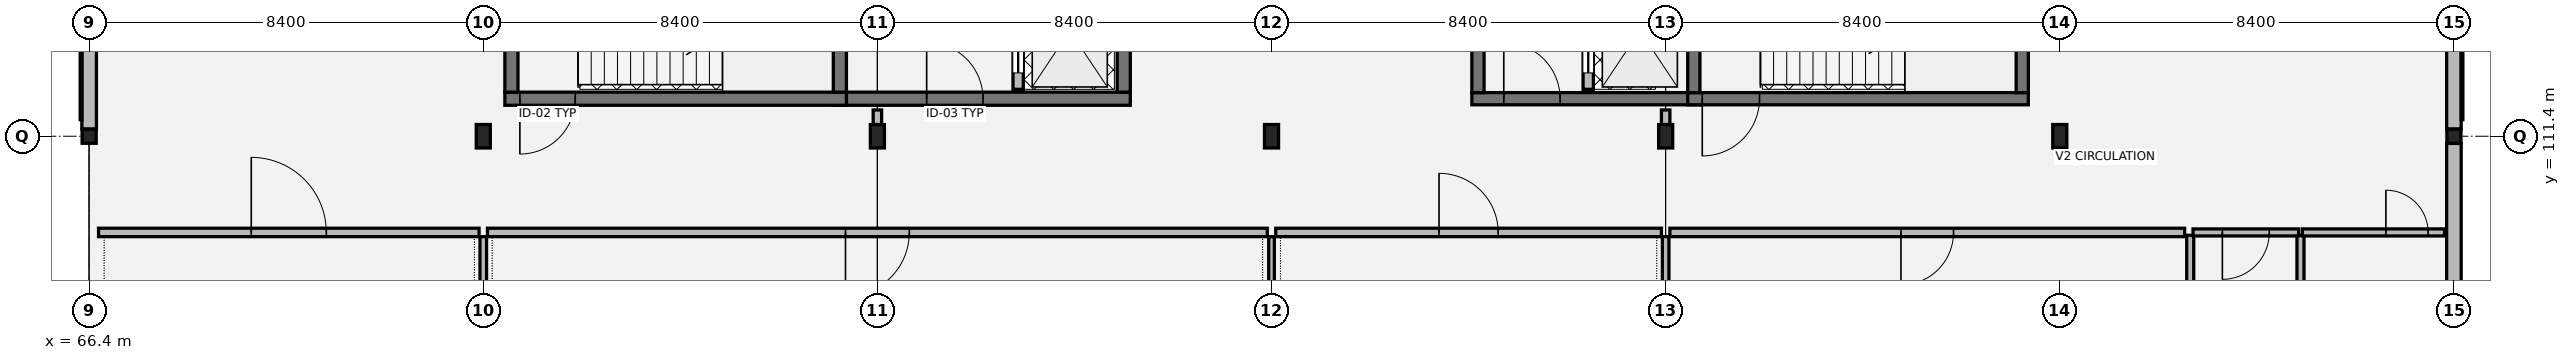
"""IFC4 building model, lengths in metres.
Left out: names, types, materials, properties, quantities, classifications, styles, units other than length and angle.
Written with IfcOpenShell. Run it as: python <this file> out.ifc"""

import sys

from ifc_helpers import new_model, si_unit, direction, frame, frame_2d, origin, origin_2d, place, context, subcontext, project, spatial, rectangle, hollow_rectangle, i_section, extrude, element, fill, save


model = new_model("IFC4")
c1 = context("Model", 3, precision=1e-05, world=origin(), true_north=direction((0.0, 1.0)))
c2 = subcontext(c1, "Body", "Model", "MODEL_VIEW")
j1 = project(units=[si_unit("LENGTHUNIT", "METRE"), si_unit("PLANEANGLEUNIT", "RADIAN")], contexts=[c1])
p1 = place(None, origin())
s1 = spatial("IfcSite", under=j1, at=p1, CompositionType="ELEMENT")
p2 = place(p1, origin())
s2 = spatial("IfcBuilding", under=s1, at=p2, CompositionType="ELEMENT")
p3 = place(p2, frame((0.0, 0.0, 5.1)))
s3 = spatial("IfcBuildingStorey", under=s2, at=p3, CompositionType="ELEMENT", Elevation=5.1)
p4 = place(p3, frame((66.4, 111.4, 0.0), z_axis=(0.0, 0.0, 1.0), x_axis=(1.0, 0.0, 0.0)))
e1 = element("IfcColumn", 1, at=p4, inside=s3, PredefinedType="COLUMN", context=c2, shape_type="SweptSolid", body=[
    extrude(hollow_rectangle(XDim=0.3, YDim=0.3, WallThickness=0.012, at=origin_2d()), origin(), (0.0, 0.0, 1.0), 4.055),
])
for number, where, z_axis, x_axis in (
    (2, (74.8, 111.4, 0.0), (0.0, 0.0, 1.0), (1.0, 0.0, 0.0)),
    (3, (83.2, 111.4, 0.0), (0.0, 0.0, 1.0), (1.0, 0.0, 0.0)),
    (4, (91.6, 111.4, 0.0), (0.0, 0.0, 1.0), (1.0, 0.0, 0.0)),
    (5, (100.0, 111.4, 0.0), (0.0, 0.0, 1.0), (1.0, 0.0, 0.0)),
    (6, (108.4, 111.4, 0.0), (0.0, 0.0, 1.0), (1.0, 0.0, 0.0)),
):
    element("IfcColumn", number, at=place(p3, frame(where, z_axis=z_axis, x_axis=x_axis)), inside=s3, PredefinedType="COLUMN", context=c2, shape_type="SweptSolid", body=[
        extrude(i_section(OverallWidth=0.3, OverallDepth=0.5, WebThickness=0.014, FlangeThickness=0.028, at=origin_2d()), origin(), (0.0, 0.0, 1.0), 4.055),
    ])
p5 = place(p3, frame((116.8, 111.4, 0.0), z_axis=(0.0, 0.0, 1.0), x_axis=(1.0, 0.0, 0.0)))
e7 = element("IfcColumn", 7, at=p5, inside=s3, PredefinedType="COLUMN", context=c2, shape_type="SweptSolid", body=[
    extrude(hollow_rectangle(XDim=0.3, YDim=0.3, WallThickness=0.012, at=origin_2d()), origin(), (0.0, 0.0, 1.0), 4.055),
])
p6 = place(p3, frame((116.8, 103.953, 0.0), z_axis=(0.0, 0.0, 1.0), x_axis=(0.0, 1.0, 0.0)))
e8 = element("IfcWall", 8, at=p6, inside=s3, PredefinedType="SOLIDWALL", context=c2, shape_type="SweptSolid", body=[
    extrude(rectangle(XDim=7.294, YDim=0.31, at=frame_2d((3.647, 0.0))), origin(), (0.0, 0.0, 1.0), 3.48),
])
p7 = place(p3, frame((116.8, 111.553, 0.0), z_axis=(0.0, 0.0, 1.0), x_axis=(0.0, 1.0, 0.0)))
e9 = element("IfcWall", 9, at=p7, inside=s3, PredefinedType="SOLIDWALL", context=c2, shape_type="SweptSolid", body=[
    extrude(rectangle(XDim=7.294, YDim=0.31, at=frame_2d((3.647, 0.0))), origin(), (0.0, 0.0, 1.0), 3.48),
])
p8 = place(p7, frame((2.042, 0.0, 0.8)))
e10 = element("IfcOpeningElement", 10, at=p8, cuts=e9, PredefinedType="OPENING", context=c2, shape_type="SweptSolid", body=[
    extrude(rectangle(XDim=1.28, YDim=2.08, at=frame_2d((0.64, 1.04))), frame((0.0, 0.165, 0.0), z_axis=(0.0, -1.0, 0.0), x_axis=(1.0, 0.0, 0.0)), (0.0, 0.0, 1.0), 0.33),
])
p9 = place(p7, frame((3.972, 0.0, 0.8)))
e11 = element("IfcOpeningElement", 11, at=p9, cuts=e9, PredefinedType="OPENING", context=c2, shape_type="SweptSolid", body=[
    extrude(rectangle(XDim=1.28, YDim=2.08, at=frame_2d((0.64, 1.04))), frame((0.0, 0.165, 0.0), z_axis=(0.0, -1.0, 0.0), x_axis=(1.0, 0.0, 0.0)), (0.0, 0.0, 1.0), 0.33),
])
p10 = place(p3, frame((66.4, 118.847, 0.0), z_axis=(0.0, 0.0, 1.0), x_axis=(0.0, -1.0, 0.0)))
e12 = element("IfcWall", 12, at=p10, inside=s3, PredefinedType="SOLIDWALL", context=c2, shape_type="SweptSolid", body=[
    extrude(rectangle(XDim=7.294, YDim=0.31, at=frame_2d((3.647, 0.0))), origin(), (0.0, 0.0, 1.0), 3.48),
])
p11 = place(p10, frame((2.042, 0.0, 0.8)))
e13 = element("IfcOpeningElement", 13, at=p11, cuts=e12, PredefinedType="OPENING", context=c2, shape_type="SweptSolid", body=[
    extrude(rectangle(XDim=1.28, YDim=2.08, at=frame_2d((0.64, 1.04))), frame((0.0, 0.165, 0.0), z_axis=(0.0, -1.0, 0.0), x_axis=(1.0, 0.0, 0.0)), (0.0, 0.0, 1.0), 0.33),
])
p12 = place(p10, frame((3.972, 0.0, 0.8)))
e14 = element("IfcOpeningElement", 14, at=p12, cuts=e12, PredefinedType="OPENING", context=c2, shape_type="SweptSolid", body=[
    extrude(rectangle(XDim=1.28, YDim=2.08, at=frame_2d((0.64, 1.04))), frame((0.0, 0.165, 0.0), z_axis=(0.0, -1.0, 0.0), x_axis=(1.0, 0.0, 0.0)), (0.0, 0.0, 1.0), 0.33),
])
p13 = place(p3, frame((82.26, 112.2, 0.0), z_axis=(0.0, 0.0, 1.0), x_axis=(1.0, 0.0, 0.0)))
e15 = element("IfcWall", 15, at=p13, inside=s3, PredefinedType="SHEAR", context=c2, shape_type="SweptSolid", body=[
    extrude(rectangle(XDim=6.33, YDim=0.28, at=frame_2d((3.165, 0.0))), origin(), (0.0, 0.0, 1.0), 3.845),
])
p14 = place(p13, frame((1.99, 0.0, 0.0)))
e16 = element("IfcOpeningElement", 16, at=p14, cuts=e15, PredefinedType="OPENING", context=c2, shape_type="SweptSolid", body=[
    extrude(rectangle(XDim=1.2, YDim=2.16, at=frame_2d((0.6, 1.08))), frame((0.0, 0.15, 0.0), z_axis=(0.0, -1.0, 0.0), x_axis=(1.0, 0.0, 0.0)), (0.0, 0.0, 1.0), 0.3),
])
p15 = place(p3, frame((88.45, 112.34, 0.0), z_axis=(0.0, 0.0, 1.0), x_axis=(0.0, 1.0, 0.0)))
e17 = element("IfcWall", 17, at=p15, inside=s3, PredefinedType="SHEAR", context=c2, shape_type="SweptSolid", body=[
    extrude(rectangle(XDim=5.72, YDim=0.28, at=frame_2d((2.86, 0.0))), origin(), (0.0, 0.0, 1.0), 3.845),
])
p16 = place(p3, frame((86.2, 112.4, 0.0), z_axis=(0.0, 0.0, 1.0), x_axis=(0.0, 1.0, 0.0)))
e18 = element("IfcWall", 18, at=p16, inside=s3, PredefinedType="SOLIDWALL", context=c2, shape_type="SweptSolid", body=[
    extrude(rectangle(XDim=5.6, YDim=0.22, at=frame_2d((2.8, 0.0))), origin(), (0.0, 0.0, 1.0), 3.845),
])
p17 = place(p16, frame((0.35, 0.0, 0.0)))
e19 = element("IfcOpeningElement", 19, at=p17, cuts=e18, PredefinedType="OPENING", context=c2, shape_type="SweptSolid", body=[
    extrude(rectangle(XDim=1.1, YDim=2.15, at=frame_2d((0.55, 1.075))), frame((0.0, 0.12, 0.0), z_axis=(0.0, -1.0, 0.0), x_axis=(1.0, 0.0, 0.0)), (0.0, 0.0, 1.0), 0.24),
])
p18 = place(p16, frame((2.4, 0.0, 0.0)))
e20 = element("IfcOpeningElement", 20, at=p18, cuts=e18, PredefinedType="OPENING", context=c2, shape_type="SweptSolid", body=[
    extrude(rectangle(XDim=1.1, YDim=2.15, at=frame_2d((0.55, 1.075))), frame((0.0, 0.12, 0.0), z_axis=(0.0, -1.0, 0.0), x_axis=(1.0, 0.0, 0.0)), (0.0, 0.0, 1.0), 0.24),
])
p19 = place(p3, frame((75.26, 112.2, 0.0), z_axis=(0.0, 0.0, 1.0), x_axis=(1.0, 0.0, 0.0)))
e21 = element("IfcWall", 21, at=p19, inside=s3, PredefinedType="SHEAR", context=c2, shape_type="SweptSolid", body=[
    extrude(rectangle(XDim=7.28, YDim=0.28, at=frame_2d((3.64, 0.0))), origin(), (0.0, 0.0, 1.0), 3.845),
])
p20 = place(p19, frame((0.32, 0.0, 0.0)))
e22 = element("IfcOpeningElement", 22, at=p20, cuts=e21, PredefinedType="OPENING", context=c2, shape_type="SweptSolid", body=[
    extrude(rectangle(XDim=1.18, YDim=2.18, at=frame_2d((0.59, 1.09))), frame((0.0, 0.15, 0.0), z_axis=(0.0, -1.0, 0.0), x_axis=(1.0, 0.0, 0.0)), (0.0, 0.0, 1.0), 0.3),
])
for number, where, z_axis, x_axis in (
    (23, (75.4, 112.34, 0.0), (0.0, 0.0, 1.0), (0.0, 1.0, 0.0)),
    (24, (82.4, 112.34, 0.0), (0.0, 0.0, 1.0), (0.0, 1.0, 0.0)),
):
    element("IfcWall", number, at=place(p3, frame(where, z_axis=z_axis, x_axis=x_axis)), inside=s3, PredefinedType="SHEAR", context=c2, shape_type="SweptSolid", body=[
        extrude(rectangle(XDim=5.72, YDim=0.28, at=frame_2d((2.86, 0.0))), origin(), (0.0, 0.0, 1.0), 3.845),
    ])
p21 = place(p3, frame((95.87, 112.2, 0.0), z_axis=(0.0, 0.0, 1.0), x_axis=(1.0, 0.0, 0.0)))
e25 = element("IfcWall", 25, at=p21, inside=s3, PredefinedType="SHEAR", context=c2, shape_type="SweptSolid", body=[
    extrude(rectangle(XDim=4.86, YDim=0.26, at=frame_2d((2.43, 0.0))), origin(), (0.0, 0.0, 1.0), 3.845),
])
p22 = place(p21, frame((0.68, 0.0, 0.0)))
e26 = element("IfcOpeningElement", 26, at=p22, cuts=e25, PredefinedType="OPENING", context=c2, shape_type="SweptSolid", body=[
    extrude(rectangle(XDim=1.2, YDim=2.16, at=frame_2d((0.6, 1.08))), frame((0.0, 0.14, 0.0), z_axis=(0.0, -1.0, 0.0), x_axis=(1.0, 0.0, 0.0)), (0.0, 0.0, 1.0), 0.28),
])
p23 = place(p3, frame((96.0, 118.07, 0.0), z_axis=(0.0, 0.0, 1.0), x_axis=(0.0, -1.0, 0.0)))
e27 = element("IfcWall", 27, at=p23, inside=s3, PredefinedType="SHEAR", context=c2, shape_type="SweptSolid", body=[
    extrude(rectangle(XDim=5.74, YDim=0.26, at=frame_2d((2.87, 0.0))), origin(), (0.0, 0.0, 1.0), 3.845),
])
p24 = place(p3, frame((98.35, 112.4, 0.0), z_axis=(0.0, 0.0, 1.0), x_axis=(0.0, 1.0, 0.0)))
e28 = element("IfcWall", 28, at=p24, inside=s3, PredefinedType="SOLIDWALL", context=c2, shape_type="SweptSolid", body=[
    extrude(rectangle(XDim=5.6, YDim=0.22, at=frame_2d((2.8, 0.0))), origin(), (0.0, 0.0, 1.0), 3.845),
])
p25 = place(p24, frame((0.35, 0.0, 0.0)))
e29 = element("IfcOpeningElement", 29, at=p25, cuts=e28, PredefinedType="OPENING", context=c2, shape_type="SweptSolid", body=[
    extrude(rectangle(XDim=1.1, YDim=2.15, at=frame_2d((0.55, 1.075))), frame((0.0, 0.12, 0.0), z_axis=(0.0, -1.0, 0.0), x_axis=(1.0, 0.0, 0.0)), (0.0, 0.0, 1.0), 0.24),
])
p26 = place(p3, frame((100.47, 112.2, 0.0), z_axis=(0.0, 0.0, 1.0), x_axis=(1.0, 0.0, 0.0)))
e30 = element("IfcWall", 30, at=p26, inside=s3, PredefinedType="SHEAR", context=c2, shape_type="SweptSolid", body=[
    extrude(rectangle(XDim=7.26, YDim=0.26, at=frame_2d((3.63, 0.0))), origin(), (0.0, 0.0, 1.0), 3.845),
])
p27 = place(p26, frame((0.31, 0.0, 0.0)))
e31 = element("IfcOpeningElement", 31, at=p27, cuts=e30, PredefinedType="OPENING", context=c2, shape_type="SweptSolid", body=[
    extrude(rectangle(XDim=1.22, YDim=2.18, at=frame_2d((0.61, 1.09))), frame((0.0, 0.14, 0.0), z_axis=(0.0, -1.0, 0.0), x_axis=(1.0, 0.0, 0.0)), (0.0, 0.0, 1.0), 0.28),
])
for number, where, z_axis, x_axis in (
    (32, (100.6, 112.33, 0.0), (0.0, 0.0, 1.0), (0.0, 1.0, 0.0)),
    (33, (107.6, 112.33, 0.0), (0.0, 0.0, 1.0), (0.0, 1.0, 0.0)),
):
    element("IfcWall", number, at=place(p3, frame(where, z_axis=z_axis, x_axis=x_axis)), inside=s3, PredefinedType="SHEAR", context=c2, shape_type="SweptSolid", body=[
        extrude(rectangle(XDim=5.74, YDim=0.26, at=frame_2d((2.87, 0.0))), origin(), (0.0, 0.0, 1.0), 3.845),
    ])
for number, where, z_axis, x_axis in (
    (34, (111.18, 106.93, 0.0), (0.0, 0.0, 1.0), (0.0, 1.0, 0.0)),
    (35, (113.53, 106.93, 0.0), (0.0, 0.0, 1.0), (0.0, 1.0, 0.0)),
):
    element("IfcWall", number, at=place(p3, frame(where, z_axis=z_axis, x_axis=x_axis)), inside=s3, PredefinedType="PARTITIONING", context=c2, shape_type="SweptSolid", body=[
        extrude(rectangle(XDim=2.36, YDim=0.15, at=frame_2d((1.18, 0.0))), origin(), (0.0, 0.0, 1.0), 3.18),
    ])
p28 = place(p3, frame((111.24, 109.35, 0.0), z_axis=(0.0, 0.0, 1.0), x_axis=(1.0, 0.0, 0.0)))
e36 = element("IfcWall", 36, at=p28, inside=s3, PredefinedType="PARTITIONING", context=c2, shape_type="SweptSolid", body=[
    extrude(rectangle(XDim=2.25, YDim=0.15, at=frame_2d((1.125, 0.0))), origin(), (0.0, 0.0, 1.0), 3.18),
])
p29 = place(p28, frame((0.625, 0.0, 0.0)))
e37 = element("IfcOpeningElement", 37, at=p29, cuts=e36, PredefinedType="OPENING", context=c2, shape_type="SweptSolid", body=[
    extrude(rectangle(XDim=1.0, YDim=2.15, at=frame_2d((0.5, 1.075))), frame((0.0, 0.085, 0.0), z_axis=(0.0, -1.0, 0.0), x_axis=(1.0, 0.0, 0.0)), (0.0, 0.0, 1.0), 0.17),
])
p30 = place(p3, frame((113.57, 109.35, 0.0), z_axis=(0.0, 0.0, 1.0), x_axis=(1.0, 0.0, 0.0)))
e38 = element("IfcWall", 38, at=p30, inside=s3, PredefinedType="PARTITIONING", context=c2, shape_type="SweptSolid", body=[
    extrude(rectangle(XDim=3.03, YDim=0.15, at=frame_2d((1.515, 0.0))), origin(), (0.0, 0.0, 1.0), 3.18),
])
p31 = place(p30, frame((1.78, 0.0, 0.0)))
e39 = element("IfcOpeningElement", 39, at=p31, cuts=e38, PredefinedType="OPENING", context=c2, shape_type="SweptSolid", body=[
    extrude(rectangle(XDim=0.9, YDim=2.15, at=frame_2d((0.45, 1.075))), frame((0.0, 0.085, 0.0), z_axis=(0.0, -1.0, 0.0), x_axis=(1.0, 0.0, 0.0)), (0.0, 0.0, 1.0), 0.17),
])
p32 = place(p3, frame((66.6, 109.35, 0.0), z_axis=(0.0, 0.0, 1.0), x_axis=(1.0, 0.0, 0.0)))
e40 = element("IfcWall", 40, at=p32, inside=s3, PredefinedType="PARTITIONING", context=c2, shape_type="SweptSolid", body=[
    extrude(rectangle(XDim=8.11, YDim=0.18, at=frame_2d((4.055, 0.0))), origin(), (0.0, 0.0, 1.0), 3.18),
])
p33 = place(p32, frame((3.255, 0.0, 0.0)))
e41 = element("IfcOpeningElement", 41, at=p33, cuts=e40, PredefinedType="OPENING", context=c2, shape_type="SweptSolid", body=[
    extrude(rectangle(XDim=1.6, YDim=2.25, at=frame_2d((0.8, 1.125))), frame((0.0, 0.1, 0.0), z_axis=(0.0, -1.0, 0.0), x_axis=(1.0, 0.0, 0.0)), (0.0, 0.0, 1.0), 0.2),
])
p34 = place(p3, frame((74.89, 109.35, 0.0), z_axis=(0.0, 0.0, 1.0), x_axis=(1.0, 0.0, 0.0)))
e42 = element("IfcWall", 42, at=p34, inside=s3, PredefinedType="PARTITIONING", context=c2, shape_type="SweptSolid", body=[
    extrude(rectangle(XDim=16.62, YDim=0.18, at=frame_2d((8.31, 0.0))), origin(), (0.0, 0.0, 1.0), 3.18),
])
p35 = place(p34, frame((7.63, 0.0, 0.0)))
e43 = element("IfcOpeningElement", 43, at=p35, cuts=e42, PredefinedType="OPENING", context=c2, shape_type="SweptSolid", body=[
    extrude(rectangle(XDim=1.36, YDim=2.2, at=frame_2d((0.68, 1.1))), frame((0.0, 0.1, 0.0), z_axis=(0.0, -1.0, 0.0), x_axis=(1.0, 0.0, 0.0)), (0.0, 0.0, 1.0), 0.2),
])
p36 = place(p3, frame((91.69, 109.35, 0.0), z_axis=(0.0, 0.0, 1.0), x_axis=(1.0, 0.0, 0.0)))
e44 = element("IfcWall", 44, at=p36, inside=s3, PredefinedType="PARTITIONING", context=c2, shape_type="SweptSolid", body=[
    extrude(rectangle(XDim=8.22, YDim=0.18, at=frame_2d((4.11, 0.0))), origin(), (0.0, 0.0, 1.0), 3.18),
])
p37 = place(p36, frame((3.48, 0.0, 0.0)))
e45 = element("IfcOpeningElement", 45, at=p37, cuts=e44, PredefinedType="OPENING", context=c2, shape_type="SweptSolid", body=[
    extrude(rectangle(XDim=1.26, YDim=2.2, at=frame_2d((0.63, 1.1))), frame((0.0, 0.1, 0.0), z_axis=(0.0, -1.0, 0.0), x_axis=(1.0, 0.0, 0.0)), (0.0, 0.0, 1.0), 0.2),
])
p38 = place(p3, frame((100.09, 109.35, 0.0), z_axis=(0.0, 0.0, 1.0), x_axis=(1.0, 0.0, 0.0)))
e46 = element("IfcWall", 46, at=p38, inside=s3, PredefinedType="PARTITIONING", context=c2, shape_type="SweptSolid", body=[
    extrude(rectangle(XDim=10.97, YDim=0.18, at=frame_2d((5.485, 0.0))), origin(), (0.0, 0.0, 1.0), 3.18),
])
p39 = place(p38, frame((4.925, 0.0, 0.0)))
e47 = element("IfcOpeningElement", 47, at=p39, cuts=e46, PredefinedType="OPENING", context=c2, shape_type="SweptSolid", body=[
    extrude(rectangle(XDim=1.12, YDim=2.15, at=frame_2d((0.56, 1.075))), frame((0.0, 0.1, 0.0), z_axis=(0.0, -1.0, 0.0), x_axis=(1.0, 0.0, 0.0)), (0.0, 0.0, 1.0), 0.2),
])
for number, where, z_axis, x_axis in (
    (48, (83.2, 111.64, 0.0), (0.0, 0.0, 1.0), (0.0, 1.0, 0.0)),
    (49, (100.0, 111.64, 0.0), (0.0, 0.0, 1.0), (0.0, 1.0, 0.0)),
):
    element("IfcWall", number, at=place(p3, frame(where, z_axis=z_axis, x_axis=x_axis)), inside=s3, PredefinedType="PARTITIONING", context=c2, shape_type="SweptSolid", body=[
        extrude(rectangle(XDim=0.32, YDim=0.18, at=frame_2d((0.16, 0.0))), origin(), (0.0, 0.0, 1.0), 3.18),
    ])
p40 = place(p3, frame((74.8, 81.32, 0.0), z_axis=(0.0, 0.0, 1.0), x_axis=(0.0, 1.0, 0.0)))
e50 = element("IfcWall", 50, at=p40, inside=s3, PredefinedType="PARTITIONING", context=c2, shape_type="SweptSolid", body=[
    extrude(rectangle(XDim=27.94, YDim=0.14, at=frame_2d((13.97, 0.0))), origin(), (0.0, 0.0, 1.0), 3.18),
])
p41 = place(p3, frame((91.6, 81.32, 0.0), z_axis=(0.0, 0.0, 1.0), x_axis=(0.0, 1.0, 0.0)))
e51 = element("IfcWall", 51, at=p41, inside=s3, PredefinedType="PARTITIONING", context=c2, shape_type="SweptSolid", body=[
    extrude(rectangle(XDim=27.94, YDim=0.12, at=frame_2d((13.97, 0.0))), origin(), (0.0, 0.0, 1.0), 3.18),
])
p42 = place(p3, frame((100.0, 81.32, 0.0), z_axis=(0.0, 0.0, 1.0), x_axis=(0.0, 1.0, 0.0)))
e52 = element("IfcWall", 52, at=p42, inside=s3, PredefinedType="PARTITIONING", context=c2, shape_type="SweptSolid", body=[
    extrude(rectangle(XDim=27.94, YDim=0.14, at=frame_2d((13.97, 0.0))), origin(), (0.0, 0.0, 1.0), 3.18),
])
p43 = place(p14, origin())
e53 = element("IfcDoor", 53, at=p43, inside=s3, OperationType="SINGLE_SWING_LEFT", PredefinedType="DOOR", context=c2, shape_type="SweptSolid", body=[
    extrude(rectangle(XDim=1.2, YDim=2.16, at=frame_2d((0.6, 1.08))), frame((0.0, 0.025, 0.0), z_axis=(0.0, -1.0, 0.0), x_axis=(1.0, 0.0, 0.0)), (0.0, 0.0, 1.0), 0.05),
])
fill(e16, e53)
p44 = place(p17, origin())
e54 = element("IfcDoor", 54, at=p44, inside=s3, OperationType="SLIDING_TO_LEFT", PredefinedType="DOOR", context=c2, shape_type="SweptSolid", body=[
    extrude(rectangle(XDim=1.1, YDim=2.15, at=frame_2d((0.55, 1.075))), frame((0.0, 0.025, 0.0), z_axis=(0.0, -1.0, 0.0), x_axis=(1.0, 0.0, 0.0)), (0.0, 0.0, 1.0), 0.05),
])
fill(e19, e54)
p45 = place(p20, origin())
e55 = element("IfcDoor", 55, at=p45, inside=s3, OperationType="SINGLE_SWING_RIGHT", PredefinedType="DOOR", context=c2, shape_type="SweptSolid", body=[
    extrude(rectangle(XDim=1.18, YDim=2.18, at=frame_2d((0.59, 1.09))), frame((0.0, 0.025, 0.0), z_axis=(0.0, -1.0, 0.0), x_axis=(1.0, 0.0, 0.0)), (0.0, 0.0, 1.0), 0.05),
])
fill(e22, e55)
p46 = place(p22, origin())
e56 = element("IfcDoor", 56, at=p46, inside=s3, OperationType="SINGLE_SWING_LEFT", PredefinedType="DOOR", context=c2, shape_type="SweptSolid", body=[
    extrude(rectangle(XDim=1.2, YDim=2.16, at=frame_2d((0.6, 1.08))), frame((0.0, 0.025, 0.0), z_axis=(0.0, -1.0, 0.0), x_axis=(1.0, 0.0, 0.0)), (0.0, 0.0, 1.0), 0.05),
])
fill(e26, e56)
p47 = place(p25, origin())
e57 = element("IfcDoor", 57, at=p47, inside=s3, OperationType="SLIDING_TO_LEFT", PredefinedType="DOOR", context=c2, shape_type="SweptSolid", body=[
    extrude(rectangle(XDim=1.1, YDim=2.15, at=frame_2d((0.55, 1.075))), frame((0.0, 0.025, 0.0), z_axis=(0.0, -1.0, 0.0), x_axis=(1.0, 0.0, 0.0)), (0.0, 0.0, 1.0), 0.05),
])
fill(e29, e57)
p48 = place(p27, origin())
e58 = element("IfcDoor", 58, at=p48, inside=s3, OperationType="SINGLE_SWING_RIGHT", PredefinedType="DOOR", context=c2, shape_type="SweptSolid", body=[
    extrude(rectangle(XDim=1.22, YDim=2.18, at=frame_2d((0.61, 1.09))), frame((0.0, 0.025, 0.0), z_axis=(0.0, -1.0, 0.0), x_axis=(1.0, 0.0, 0.0)), (0.0, 0.0, 1.0), 0.05),
])
fill(e31, e58)
p49 = place(p29, origin())
e59 = element("IfcDoor", 59, at=p49, inside=s3, OperationType="SINGLE_SWING_RIGHT", PredefinedType="DOOR", context=c2, shape_type="SweptSolid", body=[
    extrude(rectangle(XDim=1.0, YDim=2.15, at=frame_2d((0.5, 1.075))), frame((0.0, 0.025, 0.0), z_axis=(0.0, -1.0, 0.0), x_axis=(1.0, 0.0, 0.0)), (0.0, 0.0, 1.0), 0.05),
])
fill(e37, e59)
p50 = place(p31, origin())
e60 = element("IfcDoor", 60, at=p50, inside=s3, OperationType="SINGLE_SWING_LEFT", PredefinedType="DOOR", context=c2, shape_type="SweptSolid", body=[
    extrude(rectangle(XDim=0.9, YDim=2.15, at=frame_2d((0.45, 1.075))), frame((0.0, 0.025, 0.0), z_axis=(0.0, -1.0, 0.0), x_axis=(1.0, 0.0, 0.0)), (0.0, 0.0, 1.0), 0.05),
])
fill(e39, e60)
p51 = place(p33, origin())
e61 = element("IfcDoor", 61, at=p51, inside=s3, OperationType="DOUBLE_DOOR_SINGLE_SWING", PredefinedType="DOOR", context=c2, shape_type="SweptSolid", body=[
    extrude(rectangle(XDim=1.6, YDim=2.25, at=frame_2d((0.8, 1.125))), frame((0.0, 0.025, 0.0), z_axis=(0.0, -1.0, 0.0), x_axis=(1.0, 0.0, 0.0)), (0.0, 0.0, 1.0), 0.05),
])
fill(e41, e61)
p52 = place(p35, origin())
e62 = element("IfcDoor", 62, at=p52, inside=s3, OperationType="SINGLE_SWING_RIGHT", PredefinedType="DOOR", context=c2, shape_type="SweptSolid", body=[
    extrude(rectangle(XDim=1.36, YDim=2.2, at=frame_2d((0.68, 1.1))), frame((0.0, 0.025, 0.0), z_axis=(0.0, -1.0, 0.0), x_axis=(1.0, 0.0, 0.0)), (0.0, 0.0, 1.0), 0.05),
])
fill(e43, e62)
p53 = place(p37, origin())
e63 = element("IfcDoor", 63, at=p53, inside=s3, OperationType="SINGLE_SWING_LEFT", PredefinedType="DOOR", context=c2, shape_type="SweptSolid", body=[
    extrude(rectangle(XDim=1.26, YDim=2.2, at=frame_2d((0.63, 1.1))), frame((0.0, 0.025, 0.0), z_axis=(0.0, -1.0, 0.0), x_axis=(1.0, 0.0, 0.0)), (0.0, 0.0, 1.0), 0.05),
])
fill(e45, e63)
p54 = place(p39, origin())
e64 = element("IfcDoor", 64, at=p54, inside=s3, OperationType="SINGLE_SWING_RIGHT", PredefinedType="DOOR", context=c2, shape_type="SweptSolid", body=[
    extrude(rectangle(XDim=1.12, YDim=2.15, at=frame_2d((0.56, 1.075))), frame((0.0, 0.025, 0.0), z_axis=(0.0, -1.0, 0.0), x_axis=(1.0, 0.0, 0.0)), (0.0, 0.0, 1.0), 0.05),
])
fill(e47, e64)
save(model, sys.argv[1])
